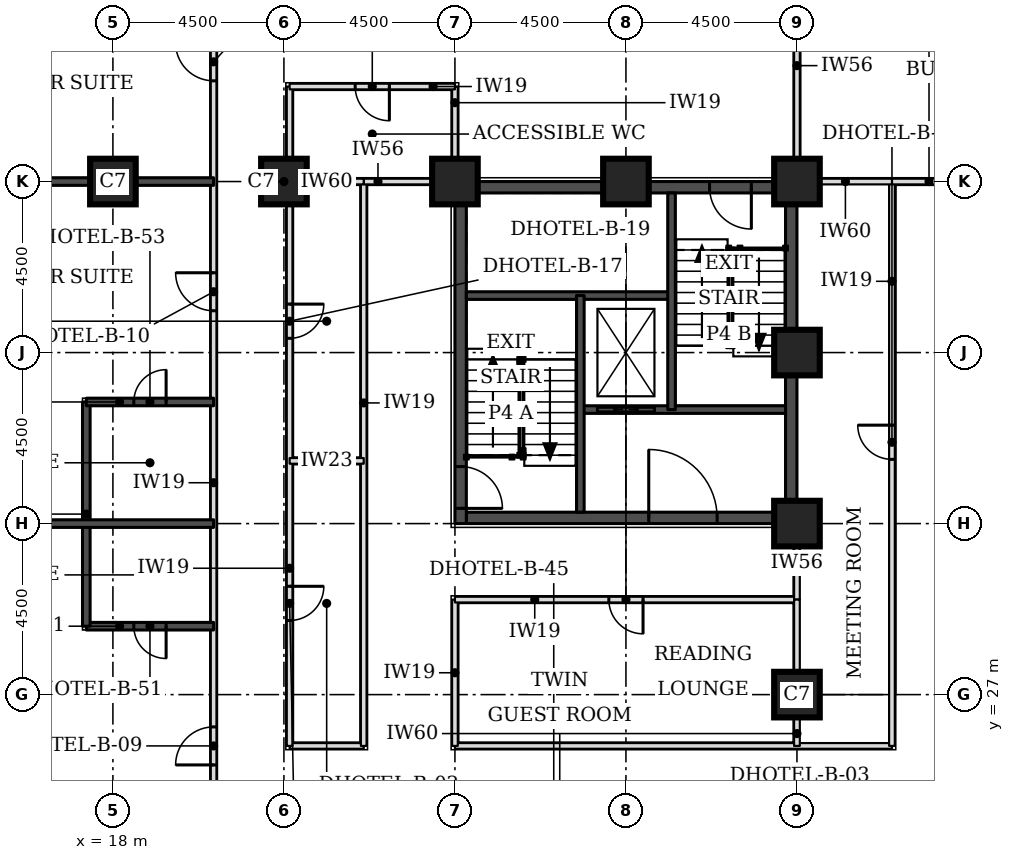
"""IFC4 building model, lengths in metres.
Left out: names, types, materials, properties, quantities, classifications, styles, units other than length and angle.
Written with IfcOpenShell. Run it as: python <this file> out.ifc"""

import sys

from ifc_helpers import new_model, si_unit, direction, frame, frame_2d, origin, origin_2d, place, context, subcontext, project, spatial, rectangle, extrude, element, fill, save


model = new_model("IFC4")
c1 = context("Model", 3, precision=1e-05, world=origin(), true_north=direction((0.0, 1.0)))
c2 = subcontext(c1, "Body", "Model", "MODEL_VIEW")
j1 = project(units=[si_unit("LENGTHUNIT", "METRE"), si_unit("PLANEANGLEUNIT", "RADIAN")], contexts=[c1])
p1 = place(None, origin())
s1 = spatial("IfcSite", under=j1, at=p1, CompositionType="ELEMENT")
p2 = place(p1, origin())
s2 = spatial("IfcBuilding", under=s1, at=p2, CompositionType="ELEMENT")
p3 = place(p2, frame((0.0, 0.0, 29.7)))
s3 = spatial("IfcBuildingStorey", under=s2, at=p3, CompositionType="ELEMENT", Elevation=29.7)
for number, where, z_axis, x_axis in (
    (1, (36.0, 27.0, 0.0), (0.0, 0.0, 1.0), (1.0, 0.0, 0.0)),
    (2, (36.0, 31.5, 0.0), (0.0, 0.0, 1.0), (1.0, 0.0, 0.0)),
    (3, (36.0, 36.0, 0.0), (0.0, 0.0, 1.0), (1.0, 0.0, 0.0)),
    (4, (18.0, 40.5, 0.0), (0.0, 0.0, 1.0), (1.0, 0.0, 0.0)),
    (5, (22.5, 40.5, 0.0), (0.0, 0.0, 1.0), (1.0, 0.0, 0.0)),
    (6, (27.0, 40.5, 0.0), (0.0, 0.0, 1.0), (1.0, 0.0, 0.0)),
    (7, (31.5, 40.5, 0.0), (0.0, 0.0, 1.0), (1.0, 0.0, 0.0)),
    (8, (36.0, 40.5, 0.0), (0.0, 0.0, 1.0), (1.0, 0.0, 0.0)),
):
    element("IfcColumn", number, at=place(p3, frame(where, z_axis=z_axis, x_axis=x_axis)), inside=s3, PredefinedType="COLUMN", context=c2, shape_type="SweptSolid", body=[
        extrude(rectangle(XDim=1.2, YDim=1.2, at=origin_2d()), origin(), (0.0, 0.0, 1.0), 3.3),
    ])
p4 = place(p3, frame((27.3, 31.65, 0.0), z_axis=(0.0, 0.0, 1.0), x_axis=(1.0, 0.0, 0.0)))
e9 = element("IfcWall", 9, at=p4, inside=s3, PredefinedType="SHEAR", context=c2, shape_type="SweptSolid", body=[
    extrude(rectangle(XDim=8.4, YDim=0.3, at=frame_2d((4.2, 0.0))), origin(), (0.0, 0.0, 1.0), 3.3),
])
p5 = place(p4, frame((4.8, 0.0, 0.0)))
e10 = element("IfcOpeningElement", 10, at=p5, cuts=e9, PredefinedType="OPENING", context=c2, shape_type="SweptSolid", body=[
    extrude(rectangle(XDim=1.8, YDim=2.1, at=frame_2d((0.9, 1.05))), frame((0.0, 0.16, 0.0), z_axis=(0.0, -1.0, 0.0), x_axis=(1.0, 0.0, 0.0)), (0.0, 0.0, 1.0), 0.32),
])
p6 = place(p3, frame((27.3, 40.35, 0.0), z_axis=(0.0, 0.0, 1.0), x_axis=(1.0, 0.0, 0.0)))
e11 = element("IfcWall", 11, at=p6, inside=s3, PredefinedType="SHEAR", context=c2, shape_type="SweptSolid", body=[
    extrude(rectangle(XDim=8.4, YDim=0.3, at=frame_2d((4.2, 0.0))), origin(), (0.0, 0.0, 1.0), 3.3),
])
p7 = place(p6, frame((6.4, 0.0, 0.0)))
e12 = element("IfcOpeningElement", 12, at=p7, cuts=e11, PredefinedType="OPENING", context=c2, shape_type="SweptSolid", body=[
    extrude(rectangle(XDim=1.1, YDim=2.1, at=frame_2d((0.55, 1.05))), frame((0.0, 0.16, 0.0), z_axis=(0.0, -1.0, 0.0), x_axis=(1.0, 0.0, 0.0)), (0.0, 0.0, 1.0), 0.32),
])
p8 = place(p3, frame((27.15, 31.5, 0.0), z_axis=(0.0, 0.0, 1.0), x_axis=(0.0, 1.0, 0.0)))
e13 = element("IfcWall", 13, at=p8, inside=s3, PredefinedType="SHEAR", context=c2, shape_type="SweptSolid", body=[
    extrude(rectangle(XDim=9.0, YDim=0.3, at=frame_2d((4.5, 0.0))), origin(), (0.0, 0.0, 1.0), 3.3),
])
p9 = place(p8, frame((0.4, 0.0, 0.0)))
e14 = element("IfcOpeningElement", 14, at=p9, cuts=e13, PredefinedType="OPENING", context=c2, shape_type="SweptSolid", body=[
    extrude(rectangle(XDim=1.1, YDim=2.1, at=frame_2d((0.55, 1.05))), frame((0.0, 0.16, 0.0), z_axis=(0.0, -1.0, 0.0), x_axis=(1.0, 0.0, 0.0)), (0.0, 0.0, 1.0), 0.32),
])
p10 = place(p3, frame((35.85, 31.5, 0.0), z_axis=(0.0, 0.0, 1.0), x_axis=(0.0, 1.0, 0.0)))
e15 = element("IfcWall", 15, at=p10, inside=s3, PredefinedType="SHEAR", context=c2, shape_type="SweptSolid", body=[
    extrude(rectangle(XDim=9.0, YDim=0.3, at=frame_2d((4.5, 0.0))), origin(), (0.0, 0.0, 1.0), 3.3),
])
p11 = place(p3, frame((20.65, 23.65, 0.0), z_axis=(0.0, 0.0, 1.0), x_axis=(0.0, 1.0, 0.0)))
e16 = element("IfcWall", 16, at=p11, inside=s3, PredefinedType="PARTITIONING", context=c2, shape_type="SweptSolid", body=[
    extrude(rectangle(XDim=25.85, YDim=0.15, at=frame_2d((12.925, 0.0))), origin(), (0.0, 0.0, 1.0), 3.08),
])
p12 = place(p11, frame((1.5, 0.0, 0.0)))
e17 = element("IfcOpeningElement", 17, at=p12, cuts=e16, PredefinedType="OPENING", context=c2, shape_type="SweptSolid", body=[
    extrude(rectangle(XDim=1.0, YDim=2.1, at=frame_2d((0.5, 1.05))), frame((0.0, 0.085, 0.0), z_axis=(0.0, -1.0, 0.0), x_axis=(1.0, 0.0, 0.0)), (0.0, 0.0, 1.0), 0.17),
])
p13 = place(p11, frame((13.45, 0.0, 0.0)))
e18 = element("IfcOpeningElement", 18, at=p13, cuts=e16, PredefinedType="OPENING", context=c2, shape_type="SweptSolid", body=[
    extrude(rectangle(XDim=1.0, YDim=2.1, at=frame_2d((0.5, 1.05))), frame((0.0, 0.085, 0.0), z_axis=(0.0, -1.0, 0.0), x_axis=(1.0, 0.0, 0.0)), (0.0, 0.0, 1.0), 0.17),
])
p14 = place(p11, frame((19.5, 0.0, 0.0)))
e19 = element("IfcOpeningElement", 19, at=p14, cuts=e16, PredefinedType="OPENING", context=c2, shape_type="SweptSolid", body=[
    extrude(rectangle(XDim=1.0, YDim=2.1, at=frame_2d((0.5, 1.05))), frame((0.0, 0.085, 0.0), z_axis=(0.0, -1.0, 0.0), x_axis=(1.0, 0.0, 0.0)), (0.0, 0.0, 1.0), 0.17),
])
p15 = place(p3, frame((22.65, 25.65, 0.0), z_axis=(0.0, 0.0, 1.0), x_axis=(1.0, 0.0, 0.0)))
e20 = element("IfcWall", 20, at=p15, inside=s3, PredefinedType="PARTITIONING", context=c2, shape_type="SweptSolid", body=[
    extrude(rectangle(XDim=1.95, YDim=0.15, at=frame_2d((0.975, 0.0))), origin(), (0.0, 0.0, 1.0), 3.08),
])
p16 = place(p3, frame((22.65, 25.65, 0.0), z_axis=(0.0, 0.0, 1.0), x_axis=(0.0, 1.0, 0.0)))
e21 = element("IfcWall", 21, at=p16, inside=s3, PredefinedType="PARTITIONING", context=c2, shape_type="SweptSolid", body=[
    extrude(rectangle(XDim=17.35, YDim=0.15, at=frame_2d((8.675, 0.0))), origin(), (0.0, 0.0, 1.0), 3.08),
])
p17 = place(p16, frame((3.3, 0.0, 0.0)))
e22 = element("IfcOpeningElement", 22, at=p17, cuts=e21, PredefinedType="OPENING", context=c2, shape_type="SweptSolid", body=[
    extrude(rectangle(XDim=0.9, YDim=2.1, at=frame_2d((0.45, 1.05))), frame((0.0, 0.085, 0.0), z_axis=(0.0, -1.0, 0.0), x_axis=(1.0, 0.0, 0.0)), (0.0, 0.0, 1.0), 0.17),
])
p18 = place(p16, frame((10.725, 0.0, 0.0)))
e23 = element("IfcOpeningElement", 23, at=p18, cuts=e21, PredefinedType="OPENING", context=c2, shape_type="SweptSolid", body=[
    extrude(rectangle(XDim=0.9, YDim=2.1, at=frame_2d((0.45, 1.05))), frame((0.0, 0.085, 0.0), z_axis=(0.0, -1.0, 0.0), x_axis=(1.0, 0.0, 0.0)), (0.0, 0.0, 1.0), 0.17),
])
p19 = place(p3, frame((24.6, 25.65, 0.0), z_axis=(0.0, 0.0, 1.0), x_axis=(0.0, 1.0, 0.0)))
e24 = element("IfcWall", 24, at=p19, inside=s3, PredefinedType="PARTITIONING", context=c2, shape_type="SweptSolid", body=[
    extrude(rectangle(XDim=14.85, YDim=0.15, at=frame_2d((7.425, 0.0))), origin(), (0.0, 0.0, 1.0), 3.08),
])
p20 = place(p3, frame((27.0, 25.65, 0.0), z_axis=(0.0, 0.0, 1.0), x_axis=(1.0, 0.0, 0.0)))
e25 = element("IfcWall", 25, at=p20, inside=s3, PredefinedType="PARTITIONING", context=c2, shape_type="SweptSolid", body=[
    extrude(rectangle(XDim=11.5, YDim=0.15, at=frame_2d((5.75, 0.0))), origin(), (0.0, 0.0, 1.0), 3.08),
])
p21 = place(p3, frame((27.0, 25.65, 0.0), z_axis=(0.0, 0.0, 1.0), x_axis=(0.0, 1.0, 0.0)))
e26 = element("IfcWall", 26, at=p21, inside=s3, PredefinedType="PARTITIONING", context=c2, shape_type="SweptSolid", body=[
    extrude(rectangle(XDim=3.85, YDim=0.15, at=frame_2d((1.925, 0.0))), origin(), (0.0, 0.0, 1.0), 3.08),
])
p22 = place(p3, frame((38.5, 25.65, 0.0), z_axis=(0.0, 0.0, 1.0), x_axis=(0.0, 1.0, 0.0)))
e27 = element("IfcWall", 27, at=p22, inside=s3, PredefinedType="PARTITIONING", context=c2, shape_type="SweptSolid", body=[
    extrude(rectangle(XDim=14.85, YDim=0.15, at=frame_2d((7.425, 0.0))), origin(), (0.0, 0.0, 1.0), 3.08),
])
p23 = place(p22, frame((7.54, 0.0, 0.0)))
e28 = element("IfcOpeningElement", 28, at=p23, cuts=e27, PredefinedType="OPENING", context=c2, shape_type="SweptSolid", body=[
    extrude(rectangle(XDim=0.9, YDim=2.1, at=frame_2d((0.45, 1.05))), frame((0.0, 0.085, 0.0), z_axis=(0.0, -1.0, 0.0), x_axis=(1.0, 0.0, 0.0)), (0.0, 0.0, 1.0), 0.17),
])
p24 = place(p3, frame((27.0, 29.5, 0.0), z_axis=(0.0, 0.0, 1.0), x_axis=(1.0, 0.0, 0.0)))
e29 = element("IfcWall", 29, at=p24, inside=s3, PredefinedType="PARTITIONING", context=c2, shape_type="SweptSolid", body=[
    extrude(rectangle(XDim=9.0, YDim=0.15, at=frame_2d((4.5, 0.0))), origin(), (0.0, 0.0, 1.0), 3.08),
])
p25 = place(p24, frame((4.05, 0.0, 0.0)))
e30 = element("IfcOpeningElement", 30, at=p25, cuts=e29, PredefinedType="OPENING", context=c2, shape_type="SweptSolid", body=[
    extrude(rectangle(XDim=0.9, YDim=2.1, at=frame_2d((0.45, 1.05))), frame((0.0, 0.085, 0.0), z_axis=(0.0, -1.0, 0.0), x_axis=(1.0, 0.0, 0.0)), (0.0, 0.0, 1.0), 0.17),
])
p26 = place(p3, frame((36.0, 29.5, 0.0), z_axis=(0.0, 0.0, 1.0), x_axis=(0.0, 1.0, 0.0)))
e31 = element("IfcWall", 31, at=p26, inside=s3, PredefinedType="PARTITIONING", context=c2, shape_type="SweptSolid", body=[
    extrude(rectangle(XDim=1.95, YDim=0.15, at=frame_2d((0.975, 0.0))), origin(), (0.0, 0.0, 1.0), 2.33),
])
p27 = place(p3, frame((24.6, 40.5, 0.0), z_axis=(0.0, 0.0, 1.0), x_axis=(1.0, 0.0, 0.0)))
e32 = element("IfcWall", 32, at=p27, inside=s3, PredefinedType="PARTITIONING", context=c2, shape_type="SweptSolid", body=[
    extrude(rectangle(XDim=2.35, YDim=0.15, at=frame_2d((1.175, 0.0))), origin(), (0.0, 0.0, 1.0), 2.33),
])
p28 = place(p3, frame((38.5, 40.5, 0.0), z_axis=(0.0, 0.0, 1.0), x_axis=(1.0, 0.0, 0.0)))
e33 = element("IfcWall", 33, at=p28, inside=s3, PredefinedType="PARTITIONING", context=c2, shape_type="SweptSolid", body=[
    extrude(rectangle(XDim=1.95, YDim=0.15, at=frame_2d((0.975, 0.0))), origin(), (0.0, 0.0, 1.0), 2.33),
])
p29 = place(p3, frame((27.0, 40.55, 0.0), z_axis=(0.0, 0.0, 1.0), x_axis=(0.0, 1.0, 0.0)))
e34 = element("IfcWall", 34, at=p29, inside=s3, PredefinedType="PARTITIONING", context=c2, shape_type="SweptSolid", body=[
    extrude(rectangle(XDim=2.45, YDim=0.15, at=frame_2d((1.225, 0.0))), origin(), (0.0, 0.0, 1.0), 3.08),
])
p30 = place(p3, frame((36.0, 40.55, 0.0), z_axis=(0.0, 0.0, 1.0), x_axis=(0.0, 1.0, 0.0)))
e35 = element("IfcWall", 35, at=p30, inside=s3, PredefinedType="PARTITIONING", context=c2, shape_type="SweptSolid", body=[
    extrude(rectangle(XDim=4.4, YDim=0.15, at=frame_2d((2.2, 0.0))), origin(), (0.0, 0.0, 1.0), 2.33),
])
p31 = place(p3, frame((22.65, 43.0, 0.0), z_axis=(0.0, 0.0, 1.0), x_axis=(1.0, 0.0, 0.0)))
e36 = element("IfcWall", 36, at=p31, inside=s3, PredefinedType="PARTITIONING", context=c2, shape_type="SweptSolid", body=[
    extrude(rectangle(XDim=4.35, YDim=0.15, at=frame_2d((2.175, 0.0))), origin(), (0.0, 0.0, 1.0), 3.08),
])
p32 = place(p31, frame((1.725, 0.0, 0.0)))
e37 = element("IfcOpeningElement", 37, at=p32, cuts=e36, PredefinedType="OPENING", context=c2, shape_type="SweptSolid", body=[
    extrude(rectangle(XDim=0.9, YDim=2.1, at=frame_2d((0.45, 1.05))), frame((0.0, 0.085, 0.0), z_axis=(0.0, -1.0, 0.0), x_axis=(1.0, 0.0, 0.0)), (0.0, 0.0, 1.0), 0.17),
])
p33 = place(p3, frame((17.3, 28.8, 0.0), z_axis=(0.0, 0.0, 1.0), x_axis=(1.0, 0.0, 0.0)))
e38 = element("IfcWall", 38, at=p33, inside=s3, PredefinedType="SOLIDWALL", context=c2, shape_type="SweptSolid", body=[
    extrude(rectangle(XDim=3.35, YDim=0.2, at=frame_2d((1.675, 0.0))), origin(), (0.0, 0.0, 1.0), 3.08),
])
p34 = place(p33, frame((1.25, 0.0, 0.0)))
e39 = element("IfcOpeningElement", 39, at=p34, cuts=e38, PredefinedType="OPENING", context=c2, shape_type="SweptSolid", body=[
    extrude(rectangle(XDim=0.85, YDim=2.1, at=frame_2d((0.425, 1.05))), frame((0.0, 0.11, 0.0), z_axis=(0.0, -1.0, 0.0), x_axis=(1.0, 0.0, 0.0)), (0.0, 0.0, 1.0), 0.22),
])
p35 = place(p3, frame((17.3, 28.8, 0.0), z_axis=(0.0, 0.0, 1.0), x_axis=(0.0, 1.0, 0.0)))
e40 = element("IfcWall", 40, at=p35, inside=s3, PredefinedType="SOLIDWALL", context=c2, shape_type="SweptSolid", body=[
    extrude(rectangle(XDim=5.9, YDim=0.2, at=frame_2d((2.95, 0.0))), origin(), (0.0, 0.0, 1.0), 3.08),
])
p36 = place(p3, frame((14.1, 31.5, 0.0), z_axis=(0.0, 0.0, 1.0), x_axis=(1.0, 0.0, 0.0)))
e41 = element("IfcWall", 41, at=p36, inside=s3, PredefinedType="SOLIDWALL", context=c2, shape_type="SweptSolid", body=[
    extrude(rectangle(XDim=6.55, YDim=0.2, at=frame_2d((3.275, 0.0))), origin(), (0.0, 0.0, 1.0), 3.08),
])
p37 = place(p3, frame((17.3, 34.7, 0.0), z_axis=(0.0, 0.0, 1.0), x_axis=(1.0, 0.0, 0.0)))
e42 = element("IfcWall", 42, at=p37, inside=s3, PredefinedType="SOLIDWALL", context=c2, shape_type="SweptSolid", body=[
    extrude(rectangle(XDim=3.35, YDim=0.2, at=frame_2d((1.675, 0.0))), origin(), (0.0, 0.0, 1.0), 3.08),
])
p38 = place(p37, frame((1.25, 0.0, 0.0)))
e43 = element("IfcOpeningElement", 43, at=p38, cuts=e42, PredefinedType="OPENING", context=c2, shape_type="SweptSolid", body=[
    extrude(rectangle(XDim=0.85, YDim=2.1, at=frame_2d((0.425, 1.05))), frame((0.0, 0.11, 0.0), z_axis=(0.0, -1.0, 0.0), x_axis=(1.0, 0.0, 0.0)), (0.0, 0.0, 1.0), 0.22),
])
p39 = place(p3, frame((14.1, 40.5, 0.0), z_axis=(0.0, 0.0, 1.0), x_axis=(1.0, 0.0, 0.0)))
e44 = element("IfcWall", 44, at=p39, inside=s3, PredefinedType="SOLIDWALL", context=c2, shape_type="SweptSolid", body=[
    extrude(rectangle(XDim=6.55, YDim=0.2, at=frame_2d((3.275, 0.0))), origin(), (0.0, 0.0, 1.0), 3.08),
])
p40 = place(p3, frame((36.0, 25.65, 0.0), z_axis=(0.0, 0.0, 1.0), x_axis=(0.0, 1.0, 0.0)))
e45 = element("IfcWall", 45, at=p40, inside=s3, PredefinedType="PARTITIONING", context=c2, shape_type="SweptSolid", body=[
    extrude(rectangle(XDim=3.85, YDim=0.15, at=frame_2d((1.925, 0.0))), origin(), (0.0, 0.0, 1.0), 2.33),
])
p41 = place(p3, frame((22.65, 33.15, 0.0), z_axis=(0.0, 0.0, 1.0), x_axis=(1.0, 0.0, 0.0)))
e46 = element("IfcWall", 46, at=p41, inside=s3, PredefinedType="PARTITIONING", context=c2, shape_type="SweptSolid", body=[
    extrude(rectangle(XDim=1.95, YDim=0.15, at=frame_2d((0.975, 0.0))), origin(), (0.0, 0.0, 1.0), 3.08),
])
p42 = place(p3, frame((22.65, 40.5, 0.0), z_axis=(0.0, 0.0, 1.0), x_axis=(1.0, 0.0, 0.0)))
e47 = element("IfcWall", 47, at=p42, inside=s3, PredefinedType="PARTITIONING", context=c2, shape_type="SweptSolid", body=[
    extrude(rectangle(XDim=1.95, YDim=0.15, at=frame_2d((0.975, 0.0))), origin(), (0.0, 0.0, 1.0), 2.33),
])
p43 = place(p3, frame((36.05, 40.5, 0.0), z_axis=(0.0, 0.0, 1.0), x_axis=(1.0, 0.0, 0.0)))
e48 = element("IfcWall", 48, at=p43, inside=s3, PredefinedType="PARTITIONING", context=c2, shape_type="SweptSolid", body=[
    extrude(rectangle(XDim=2.45, YDim=0.15, at=frame_2d((1.225, 0.0))), origin(), (0.0, 0.0, 1.0), 2.33),
])
p44 = place(p3, frame((30.3, 34.5, 0.0), z_axis=(0.0, 0.0, 1.0), x_axis=(1.0, 0.0, 0.0)))
e49 = element("IfcWall", 49, at=p44, inside=s3, PredefinedType="SOLIDWALL", context=c2, shape_type="SweptSolid", body=[
    extrude(rectangle(XDim=5.4, YDim=0.2, at=frame_2d((2.7, 0.0))), origin(), (0.0, 0.0, 1.0), 3.08),
])
p45 = place(p44, frame((0.45, 0.0, 0.0)))
e50 = element("IfcOpeningElement", 50, at=p45, cuts=e49, PredefinedType="OPENING", context=c2, shape_type="SweptSolid", body=[
    extrude(rectangle(XDim=1.5, YDim=2.1, at=frame_2d((0.75, 1.05))), frame((0.0, 0.11, 0.0), z_axis=(0.0, -1.0, 0.0), x_axis=(1.0, 0.0, 0.0)), (0.0, 0.0, 1.0), 0.22),
])
p46 = place(p3, frame((27.3, 37.5, 0.0), z_axis=(0.0, 0.0, 1.0), x_axis=(1.0, 0.0, 0.0)))
e51 = element("IfcWall", 51, at=p46, inside=s3, PredefinedType="SOLIDWALL", context=c2, shape_type="SweptSolid", body=[
    extrude(rectangle(XDim=5.4, YDim=0.2, at=frame_2d((2.7, 0.0))), origin(), (0.0, 0.0, 1.0), 3.08),
])
for number, where, z_axis, x_axis in (
    (52, (30.3, 31.8, 0.0), (0.0, 0.0, 1.0), (0.0, 1.0, 0.0)),
    (53, (32.7, 34.5, 0.0), (0.0, 0.0, 1.0), (0.0, 1.0, 0.0)),
):
    element("IfcWall", number, at=place(p3, frame(where, z_axis=z_axis, x_axis=x_axis)), inside=s3, PredefinedType="SOLIDWALL", context=c2, shape_type="SweptSolid", body=[
        extrude(rectangle(XDim=5.7, YDim=0.2, at=frame_2d((2.85, 0.0))), origin(), (0.0, 0.0, 1.0), 3.08),
    ])
p47 = place(p12, origin())
e54 = element("IfcDoor", 54, at=p47, inside=s3, OperationType="SINGLE_SWING_LEFT", PredefinedType="DOOR", context=c2, shape_type="SweptSolid", body=[
    extrude(rectangle(XDim=1.0, YDim=2.1, at=frame_2d((0.5, 1.05))), frame((0.0, 0.025, 0.0), z_axis=(0.0, -1.0, 0.0), x_axis=(1.0, 0.0, 0.0)), (0.0, 0.0, 1.0), 0.05),
])
fill(e17, e54)
p48 = place(p34, frame((0.85, 0.0, 0.0), z_axis=(0.0, 0.0, 1.0), x_axis=(-1.0, 0.0, 0.0)))
e55 = element("IfcDoor", 55, at=p48, inside=s3, OperationType="SINGLE_SWING_LEFT", PredefinedType="DOOR", context=c2, shape_type="SweptSolid", body=[
    extrude(rectangle(XDim=0.85, YDim=2.1, at=frame_2d((0.425, 1.05))), frame((0.0, 0.025, 0.0), z_axis=(0.0, -1.0, 0.0), x_axis=(1.0, 0.0, 0.0)), (0.0, 0.0, 1.0), 0.05),
])
fill(e39, e55)
p49 = place(p13, origin())
e56 = element("IfcDoor", 56, at=p49, inside=s3, OperationType="SINGLE_SWING_RIGHT", PredefinedType="DOOR", context=c2, shape_type="SweptSolid", body=[
    extrude(rectangle(XDim=1.0, YDim=2.1, at=frame_2d((0.5, 1.05))), frame((0.0, 0.025, 0.0), z_axis=(0.0, -1.0, 0.0), x_axis=(1.0, 0.0, 0.0)), (0.0, 0.0, 1.0), 0.05),
])
fill(e18, e56)
p50 = place(p38, origin())
e57 = element("IfcDoor", 57, at=p50, inside=s3, OperationType="SINGLE_SWING_RIGHT", PredefinedType="DOOR", context=c2, shape_type="SweptSolid", body=[
    extrude(rectangle(XDim=0.85, YDim=2.1, at=frame_2d((0.425, 1.05))), frame((0.0, 0.025, 0.0), z_axis=(0.0, -1.0, 0.0), x_axis=(1.0, 0.0, 0.0)), (0.0, 0.0, 1.0), 0.05),
])
fill(e43, e57)
p51 = place(p14, origin())
e58 = element("IfcDoor", 58, at=p51, inside=s3, OperationType="SINGLE_SWING_RIGHT", PredefinedType="DOOR", context=c2, shape_type="SweptSolid", body=[
    extrude(rectangle(XDim=1.0, YDim=2.1, at=frame_2d((0.5, 1.05))), frame((0.0, 0.025, 0.0), z_axis=(0.0, -1.0, 0.0), x_axis=(1.0, 0.0, 0.0)), (0.0, 0.0, 1.0), 0.05),
])
fill(e19, e58)
p52 = place(p17, frame((0.9, 0.0, 0.0), z_axis=(0.0, 0.0, 1.0), x_axis=(-1.0, 0.0, 0.0)))
e59 = element("IfcDoor", 59, at=p52, inside=s3, OperationType="SINGLE_SWING_LEFT", PredefinedType="DOOR", context=c2, shape_type="SweptSolid", body=[
    extrude(rectangle(XDim=0.9, YDim=2.1, at=frame_2d((0.45, 1.05))), frame((0.0, 0.025, 0.0), z_axis=(0.0, -1.0, 0.0), x_axis=(1.0, 0.0, 0.0)), (0.0, 0.0, 1.0), 0.05),
])
fill(e22, e59)
p53 = place(p18, frame((0.9, 0.0, 0.0), z_axis=(0.0, 0.0, 1.0), x_axis=(-1.0, 0.0, 0.0)))
e60 = element("IfcDoor", 60, at=p53, inside=s3, OperationType="SINGLE_SWING_LEFT", PredefinedType="DOOR", context=c2, shape_type="SweptSolid", body=[
    extrude(rectangle(XDim=0.9, YDim=2.1, at=frame_2d((0.45, 1.05))), frame((0.0, 0.025, 0.0), z_axis=(0.0, -1.0, 0.0), x_axis=(1.0, 0.0, 0.0)), (0.0, 0.0, 1.0), 0.05),
])
fill(e23, e60)
p54 = place(p25, frame((0.9, 0.0, 0.0), z_axis=(0.0, 0.0, 1.0), x_axis=(-1.0, 0.0, 0.0)))
e61 = element("IfcDoor", 61, at=p54, inside=s3, OperationType="SINGLE_SWING_LEFT", PredefinedType="DOOR", context=c2, shape_type="SweptSolid", body=[
    extrude(rectangle(XDim=0.9, YDim=2.1, at=frame_2d((0.45, 1.05))), frame((0.0, 0.025, 0.0), z_axis=(0.0, -1.0, 0.0), x_axis=(1.0, 0.0, 0.0)), (0.0, 0.0, 1.0), 0.05),
])
fill(e30, e61)
p55 = place(p32, frame((0.9, 0.0, 0.0), z_axis=(0.0, 0.0, 1.0), x_axis=(-1.0, 0.0, 0.0)))
e62 = element("IfcDoor", 62, at=p55, inside=s3, OperationType="SINGLE_SWING_LEFT", PredefinedType="DOOR", context=c2, shape_type="SweptSolid", body=[
    extrude(rectangle(XDim=0.9, YDim=2.1, at=frame_2d((0.45, 1.05))), frame((0.0, 0.025, 0.0), z_axis=(0.0, -1.0, 0.0), x_axis=(1.0, 0.0, 0.0)), (0.0, 0.0, 1.0), 0.05),
])
fill(e37, e62)
p56 = place(p23, origin())
e63 = element("IfcDoor", 63, at=p56, inside=s3, OperationType="SINGLE_SWING_RIGHT", PredefinedType="DOOR", context=c2, shape_type="SweptSolid", body=[
    extrude(rectangle(XDim=0.9, YDim=2.1, at=frame_2d((0.45, 1.05))), frame((0.0, 0.025, 0.0), z_axis=(0.0, -1.0, 0.0), x_axis=(1.0, 0.0, 0.0)), (0.0, 0.0, 1.0), 0.05),
])
fill(e28, e63)
p57 = place(p9, frame((1.1, 0.0, 0.0), z_axis=(0.0, 0.0, 1.0), x_axis=(-1.0, 0.0, 0.0)))
e64 = element("IfcDoor", 64, at=p57, inside=s3, OperationType="SINGLE_SWING_RIGHT", PredefinedType="DOOR", context=c2, shape_type="SweptSolid", body=[
    extrude(rectangle(XDim=1.1, YDim=2.1, at=frame_2d((0.55, 1.05))), frame((0.0, 0.025, 0.0), z_axis=(0.0, -1.0, 0.0), x_axis=(1.0, 0.0, 0.0)), (0.0, 0.0, 1.0), 0.05),
])
fill(e14, e64)
p58 = place(p7, frame((1.1, 0.0, 0.0), z_axis=(0.0, 0.0, 1.0), x_axis=(-1.0, 0.0, 0.0)))
e65 = element("IfcDoor", 65, at=p58, inside=s3, OperationType="SINGLE_SWING_LEFT", PredefinedType="DOOR", context=c2, shape_type="SweptSolid", body=[
    extrude(rectangle(XDim=1.1, YDim=2.1, at=frame_2d((0.55, 1.05))), frame((0.0, 0.025, 0.0), z_axis=(0.0, -1.0, 0.0), x_axis=(1.0, 0.0, 0.0)), (0.0, 0.0, 1.0), 0.05),
])
fill(e12, e65)
p59 = place(p45, origin())
e66 = element("IfcDoor", 66, at=p59, inside=s3, OperationType="DOUBLE_DOOR_SLIDING", PredefinedType="DOOR", context=c2, shape_type="SweptSolid", body=[
    extrude(rectangle(XDim=1.5, YDim=2.1, at=frame_2d((0.75, 1.05))), frame((0.0, 0.025, 0.0), z_axis=(0.0, -1.0, 0.0), x_axis=(1.0, 0.0, 0.0)), (0.0, 0.0, 1.0), 0.05),
])
fill(e50, e66)
p60 = place(p5, origin())
e67 = element("IfcDoor", 67, at=p60, inside=s3, OperationType="SINGLE_SWING_LEFT", PredefinedType="DOOR", context=c2, shape_type="SweptSolid", body=[
    extrude(rectangle(XDim=1.8, YDim=2.1, at=frame_2d((0.9, 1.05))), frame((0.0, 0.025, 0.0), z_axis=(0.0, -1.0, 0.0), x_axis=(1.0, 0.0, 0.0)), (0.0, 0.0, 1.0), 0.05),
])
fill(e10, e67)
save(model, sys.argv[1])
